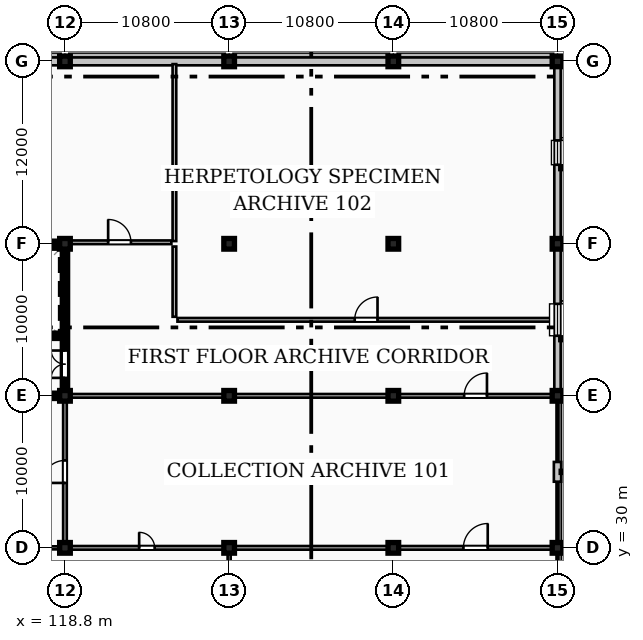
"""IFC4 building model, lengths in metres.
Left out: names, types, materials, properties, quantities, classifications, styles, units other than length and angle.
Written with IfcOpenShell. Run it as: python <this file> out.ifc"""

import sys

from ifc_helpers import new_model, si_unit, direction, frame, frame_2d, origin, origin_2d, place, context, subcontext, project, spatial, polyline, rectangle, outline, extrude, element, fill, save


model = new_model("IFC4")
c1 = context("Model", 3, precision=1e-05, world=origin(), true_north=direction((0.0, 1.0)))
c2 = subcontext(c1, "Body", "Model", "MODEL_VIEW")
j1 = project(units=[si_unit("LENGTHUNIT", "METRE"), si_unit("PLANEANGLEUNIT", "RADIAN")], contexts=[c1])
p1 = place(None, origin())
s1 = spatial("IfcSite", under=j1, at=p1, CompositionType="ELEMENT")
p2 = place(p1, origin())
s2 = spatial("IfcBuilding", under=s1, at=p2, CompositionType="ELEMENT")
p3 = place(p2, frame((0.0, 0.0, 4.8)))
s3 = spatial("IfcBuildingStorey", under=s2, at=p3, CompositionType="ELEMENT", Elevation=4.8)
for number, where, z_axis, x_axis in (
    (1, (118.8, 30.0, 0.0), (0.0, 0.0, 1.0), (1.0, 0.0, 0.0)),
    (2, (118.8, 40.0, 0.0), (0.0, 0.0, 1.0), (1.0, 0.0, 0.0)),
    (3, (118.8, 50.0, 0.0), (0.0, 0.0, 1.0), (1.0, 0.0, 0.0)),
    (4, (118.8, 62.0, 0.0), (0.0, 0.0, 1.0), (1.0, 0.0, 0.0)),
    (5, (129.6, 30.0, 0.0), (0.0, 0.0, 1.0), (1.0, 0.0, 0.0)),
    (6, (129.6, 40.0, 0.0), (0.0, 0.0, 1.0), (1.0, 0.0, 0.0)),
    (7, (129.6, 50.0, 0.0), (0.0, 0.0, 1.0), (1.0, 0.0, 0.0)),
    (8, (129.6, 62.0, 0.0), (0.0, 0.0, 1.0), (1.0, 0.0, 0.0)),
    (9, (140.4, 30.0, 0.0), (0.0, 0.0, 1.0), (1.0, 0.0, 0.0)),
    (10, (140.4, 40.0, 0.0), (0.0, 0.0, 1.0), (1.0, 0.0, 0.0)),
    (11, (140.4, 50.0, 0.0), (0.0, 0.0, 1.0), (1.0, 0.0, 0.0)),
    (12, (140.4, 62.0, 0.0), (0.0, 0.0, 1.0), (1.0, 0.0, 0.0)),
    (13, (151.2, 30.0, 0.0), (0.0, 0.0, 1.0), (1.0, 0.0, 0.0)),
    (14, (151.2, 40.0, 0.0), (0.0, 0.0, 1.0), (1.0, 0.0, 0.0)),
    (15, (151.2, 50.0, 0.0), (0.0, 0.0, 1.0), (1.0, 0.0, 0.0)),
    (16, (151.2, 62.0, 0.0), (0.0, 0.0, 1.0), (1.0, 0.0, 0.0)),
):
    element("IfcColumn", number, at=place(p3, frame(where, z_axis=z_axis, x_axis=x_axis)), inside=s3, PredefinedType="COLUMN", context=c2, shape_type="SweptSolid", body=[
        extrude(rectangle(XDim=0.7, YDim=0.7, at=origin_2d()), origin(), (0.0, 0.0, 1.0), 4.8),
    ])
p4 = place(p3, frame((151.2, 29.63, 0.0), z_axis=(0.0, 0.0, 1.0), x_axis=(0.0, 1.0, 0.0)))
e17 = element("IfcWall", 17, at=p4, inside=s3, PredefinedType="STANDARD", context=c2, shape_type="SweptSolid", body=[
    extrude(rectangle(XDim=0.225, YDim=0.3, at=frame_2d((0.113, 0.0))), origin(), (0.0, 0.0, 1.0), 4.56),
])
p5 = place(p3, frame((151.2, 34.35, 0.0), z_axis=(0.0, 0.0, 1.0), x_axis=(0.0, 1.0, 0.0)))
e18 = element("IfcWall", 18, at=p5, inside=s3, PredefinedType="STANDARD", context=c2, shape_type="SweptSolid", body=[
    extrude(rectangle(XDim=1.3, YDim=0.48, at=frame_2d((0.65, 0.0))), origin(), (0.0, 0.0, 1.0), 4.13),
])
for number, where, z_axis, x_axis in (
    (19, (151.2, 30.145, 0.0), (0.0, 0.0, 1.0), (0.0, 1.0, 0.0)),
    (20, (151.2, 39.63, 0.0), (0.0, 0.0, 1.0), (0.0, 1.0, 0.0)),
):
    element("IfcWall", number, at=place(p3, frame(where, z_axis=z_axis, x_axis=x_axis)), inside=s3, PredefinedType="STANDARD", context=c2, shape_type="SweptSolid", body=[
        extrude(rectangle(XDim=0.225, YDim=0.3, at=frame_2d((0.113, 0.0))), origin(), (0.0, 0.0, 1.0), 4.56),
    ])
p6 = place(p3, frame((151.2, 40.145, 0.0), z_axis=(0.0, 0.0, 1.0), x_axis=(0.0, 1.0, 0.0)))
e21 = element("IfcWall", 21, at=p6, inside=s3, PredefinedType="STANDARD", context=c2, shape_type="SweptSolid", body=[
    extrude(rectangle(XDim=9.71, YDim=0.42, at=frame_2d((4.855, 0.0))), origin(), (0.0, 0.0, 1.0), 4.13),
])
p7 = place(p6, frame((3.805, 0.0, 1.2)))
e22 = element("IfcOpeningElement", 22, at=p7, cuts=e21, PredefinedType="OPENING", context=c2, shape_type="SweptSolid", body=[
    extrude(rectangle(XDim=2.1, YDim=1.6, at=frame_2d((1.05, 0.8))), frame((0.0, 0.22, 0.0), z_axis=(0.0, -1.0, 0.0), x_axis=(1.0, 0.0, 0.0)), (0.0, 0.0, 1.0), 0.44),
])
p8 = place(p3, frame((151.2, 50.145, 0.0), z_axis=(0.0, 0.0, 1.0), x_axis=(0.0, 1.0, 0.0)))
e23 = element("IfcWall", 23, at=p8, inside=s3, PredefinedType="STANDARD", context=c2, shape_type="SweptSolid", body=[
    extrude(rectangle(XDim=11.71, YDim=0.42, at=frame_2d((5.855, 0.0))), origin(), (0.0, 0.0, 1.0), 4.13),
])
p9 = place(p8, frame((5.055, 0.0, 1.2)))
e24 = element("IfcOpeningElement", 24, at=p9, cuts=e23, PredefinedType="OPENING", context=c2, shape_type="SweptSolid", body=[
    extrude(rectangle(XDim=1.6, YDim=1.8, at=frame_2d((0.8, 0.9))), frame((0.0, 0.22, 0.0), z_axis=(0.0, -1.0, 0.0), x_axis=(1.0, 0.0, 0.0)), (0.0, 0.0, 1.0), 0.44),
])
p10 = place(p3, frame((151.055, 62.0, 0.0), z_axis=(0.0, 0.0, 1.0), x_axis=(-1.0, 0.0, 0.0)))
e25 = element("IfcWall", 25, at=p10, inside=s3, PredefinedType="SOLIDWALL", context=c2, shape_type="SweptSolid", body=[
    extrude(rectangle(XDim=10.51, YDim=0.52, at=frame_2d((5.255, 0.0))), origin(), (0.0, 0.0, 1.0), 4.13),
])
p11 = place(p3, frame((140.255, 62.0, 0.0), z_axis=(0.0, 0.0, 1.0), x_axis=(-1.0, 0.0, 0.0)))
e26 = element("IfcWall", 26, at=p11, inside=s3, PredefinedType="SOLIDWALL", context=c2, shape_type="SweptSolid", body=[
    extrude(rectangle(XDim=10.51, YDim=0.52, at=frame_2d((5.255, 0.0))), origin(), (0.0, 0.0, 1.0), 3.83),
])
for number, where, z_axis, x_axis in (
    (27, (129.455, 62.0, 0.0), (0.0, 0.0, 1.0), (-1.0, 0.0, 0.0)),
    (28, (118.655, 62.0, 0.0), (0.0, 0.0, 1.0), (-1.0, 0.0, 0.0)),
):
    element("IfcWall", number, at=place(p3, frame(where, z_axis=z_axis, x_axis=x_axis)), inside=s3, PredefinedType="SOLIDWALL", context=c2, shape_type="SweptSolid", body=[
        extrude(rectangle(XDim=10.51, YDim=0.52, at=frame_2d((5.255, 0.0))), origin(), (0.0, 0.0, 1.0), 3.83),
    ])
p12 = place(p3, frame((151.55, 62.0, -0.02), z_axis=(0.0, 0.0, 1.0), x_axis=(1.0, 0.0, 0.0)))
e29 = element("IfcWall", 29, at=p12, inside=s3, PredefinedType="STANDARD", context=c2, shape_type="SweptSolid", body=[
    extrude(outline(polyline([(0.0, 0.0), (10.25, 0.0), (10.25, 0.04), (0.0, 1.12), (0.0, 0.0)])), frame((0.0, 0.14, 0.0), z_axis=(0.0, -1.0, 0.0), x_axis=(1.0, 0.0, 0.0)), (0.0, 0.0, 1.0), 0.28),
])
for number, where, z_axis, x_axis in (
    (30, (108.35, 40.0, 0.0), (0.0, 0.0, 1.0), (1.0, 0.0, 0.0)),
    (31, (108.35, 50.0, 0.0), (0.0, 0.0, 1.0), (1.0, 0.0, 0.0)),
):
    element("IfcWall", number, at=place(p3, frame(where, z_axis=z_axis, x_axis=x_axis)), inside=s3, PredefinedType="SHEAR", context=c2, shape_type="SweptSolid", body=[
        extrude(rectangle(XDim=10.1, YDim=0.35, at=frame_2d((5.05, 0.0))), origin(), (0.0, 0.0, 1.0), 4.56),
    ])
p13 = place(p3, frame((118.8, 40.35, 0.0), z_axis=(0.0, 0.0, 1.0), x_axis=(0.0, 1.0, 0.0)))
e32 = element("IfcWall", 32, at=p13, inside=s3, PredefinedType="SHEAR", context=c2, shape_type="SweptSolid", body=[
    extrude(rectangle(XDim=9.3, YDim=0.35, at=frame_2d((4.65, 0.0))), origin(), (0.0, 0.0, 1.0), 4.56),
])
p14 = place(p13, frame((0.83, 0.0, 0.0)))
e33 = element("IfcOpeningElement", 33, at=p14, cuts=e32, PredefinedType="OPENING", context=c2, shape_type="SweptSolid", body=[
    extrude(rectangle(XDim=1.8, YDim=2.25, at=frame_2d((0.9, 1.125))), frame((0.0, 0.185, 0.0), z_axis=(0.0, -1.0, 0.0), x_axis=(1.0, 0.0, 0.0)), (0.0, 0.0, 1.0), 0.37),
])
p15 = place(p3, frame((113.13, 43.95, 0.0), z_axis=(0.0, 0.0, 1.0), x_axis=(1.0, 0.0, 0.0)))
e34 = element("IfcWall", 34, at=p15, inside=s3, PredefinedType="SHEAR", context=c2, shape_type="SweptSolid", body=[
    extrude(rectangle(XDim=5.49, YDim=0.35, at=frame_2d((2.745, 0.0))), origin(), (0.0, 0.0, 1.0), 4.56),
])
p16 = place(p15, frame((2.1, 0.0, 0.0)))
e35 = element("IfcOpeningElement", 35, at=p16, cuts=e34, PredefinedType="OPENING", context=c2, shape_type="SweptSolid", body=[
    extrude(rectangle(XDim=1.1, YDim=2.2, at=frame_2d((0.55, 1.1))), frame((0.0, 0.185, 0.0), z_axis=(0.0, -1.0, 0.0), x_axis=(1.0, 0.0, 0.0)), (0.0, 0.0, 1.0), 0.37),
])
p17 = place(p3, frame((118.98, 30.0, 0.0), z_axis=(0.0, 0.0, 1.0), x_axis=(1.0, 0.0, 0.0)))
e36 = element("IfcWall", 36, at=p17, inside=s3, PredefinedType="SOLIDWALL", context=c2, shape_type="SweptSolid", body=[
    extrude(rectangle(XDim=10.42, YDim=0.24, at=frame_2d((5.21, 0.0))), origin(), (0.0, 0.0, 1.0), 3.83),
])
p18 = place(p17, frame((4.7, 0.0, 0.0)))
e37 = element("IfcOpeningElement", 37, at=p18, cuts=e36, PredefinedType="OPENING", context=c2, shape_type="SweptSolid", body=[
    extrude(rectangle(XDim=1.02, YDim=2.2, at=frame_2d((0.51, 1.1))), frame((0.0, 0.13, 0.0), z_axis=(0.0, -1.0, 0.0), x_axis=(1.0, 0.0, 0.0)), (0.0, 0.0, 1.0), 0.26),
])
p19 = place(p3, frame((129.8, 30.0, 0.0), z_axis=(0.0, 0.0, 1.0), x_axis=(1.0, 0.0, 0.0)))
e38 = element("IfcWall", 38, at=p19, inside=s3, PredefinedType="SOLIDWALL", context=c2, shape_type="SweptSolid", body=[
    extrude(rectangle(XDim=10.4, YDim=0.24, at=frame_2d((5.2, 0.0))), origin(), (0.0, 0.0, 1.0), 3.83),
])
p20 = place(p3, frame((140.6, 30.0, 0.0), z_axis=(0.0, 0.0, 1.0), x_axis=(1.0, 0.0, 0.0)))
e39 = element("IfcWall", 39, at=p20, inside=s3, PredefinedType="SOLIDWALL", context=c2, shape_type="SweptSolid", body=[
    extrude(rectangle(XDim=10.42, YDim=0.24, at=frame_2d((5.21, 0.0))), origin(), (0.0, 0.0, 1.0), 4.13),
])
p21 = place(p20, frame((4.41, 0.0, 0.0)))
e40 = element("IfcOpeningElement", 40, at=p21, cuts=e39, PredefinedType="OPENING", context=c2, shape_type="SweptSolid", body=[
    extrude(rectangle(XDim=1.6, YDim=2.3, at=frame_2d((0.8, 1.15))), frame((0.0, 0.13, 0.0), z_axis=(0.0, -1.0, 0.0), x_axis=(1.0, 0.0, 0.0)), (0.0, 0.0, 1.0), 0.26),
])
p22 = place(p3, frame((118.98, 40.0, 0.0), z_axis=(0.0, 0.0, 1.0), x_axis=(1.0, 0.0, 0.0)))
e41 = element("IfcWall", 41, at=p22, inside=s3, PredefinedType="SOLIDWALL", context=c2, shape_type="SweptSolid", body=[
    extrude(rectangle(XDim=10.42, YDim=0.24, at=frame_2d((5.21, 0.0))), origin(), (0.0, 0.0, 1.0), 3.83),
])
p23 = place(p3, frame((129.8, 40.0, 0.0), z_axis=(0.0, 0.0, 1.0), x_axis=(1.0, 0.0, 0.0)))
e42 = element("IfcWall", 42, at=p23, inside=s3, PredefinedType="SOLIDWALL", context=c2, shape_type="SweptSolid", body=[
    extrude(rectangle(XDim=10.4, YDim=0.24, at=frame_2d((5.2, 0.0))), origin(), (0.0, 0.0, 1.0), 3.83),
])
p24 = place(p3, frame((140.6, 40.0, 0.0), z_axis=(0.0, 0.0, 1.0), x_axis=(1.0, 0.0, 0.0)))
e43 = element("IfcWall", 43, at=p24, inside=s3, PredefinedType="SOLIDWALL", context=c2, shape_type="SweptSolid", body=[
    extrude(rectangle(XDim=10.42, YDim=0.24, at=frame_2d((5.21, 0.0))), origin(), (0.0, 0.0, 1.0), 4.13),
])
p25 = place(p24, frame((4.46, 0.0, 0.0)))
e44 = element("IfcOpeningElement", 44, at=p25, cuts=e43, PredefinedType="OPENING", context=c2, shape_type="SweptSolid", body=[
    extrude(rectangle(XDim=1.5, YDim=2.4, at=frame_2d((0.75, 1.2))), frame((0.0, 0.13, 0.0), z_axis=(0.0, -1.0, 0.0), x_axis=(1.0, 0.0, 0.0)), (0.0, 0.0, 1.0), 0.26),
])
p26 = place(p3, frame((126.2, 45.0, 0.0), z_axis=(0.0, 0.0, 1.0), x_axis=(1.0, 0.0, 0.0)))
e45 = element("IfcWall", 45, at=p26, inside=s3, PredefinedType="SOLIDWALL", context=c2, shape_type="SweptSolid", body=[
    extrude(rectangle(XDim=24.82, YDim=0.24, at=frame_2d((12.41, 0.0))), origin(), (0.0, 0.0, 1.0), 4.52),
])
p27 = place(p26, frame((11.66, 0.0, 0.0)))
e46 = element("IfcOpeningElement", 46, at=p27, cuts=e45, PredefinedType="OPENING", context=c2, shape_type="SweptSolid", body=[
    extrude(rectangle(XDim=1.5, YDim=2.4, at=frame_2d((0.75, 1.2))), frame((0.0, 0.13, 0.0), z_axis=(0.0, -1.0, 0.0), x_axis=(1.0, 0.0, 0.0)), (0.0, 0.0, 1.0), 0.26),
])
p28 = place(p3, frame((118.98, 50.1, 0.0), z_axis=(0.0, 0.0, 1.0), x_axis=(1.0, 0.0, 0.0)))
e47 = element("IfcWall", 47, at=p28, inside=s3, PredefinedType="SOLIDWALL", context=c2, shape_type="SweptSolid", body=[
    extrude(rectangle(XDim=6.82, YDim=0.24, at=frame_2d((3.41, 0.0))), origin(), (0.0, 0.0, 1.0), 3.83),
])
p29 = place(p28, frame((2.66, 0.0, 0.0)))
e48 = element("IfcOpeningElement", 48, at=p29, cuts=e47, PredefinedType="OPENING", context=c2, shape_type="SweptSolid", body=[
    extrude(rectangle(XDim=1.5, YDim=2.4, at=frame_2d((0.75, 1.2))), frame((0.0, 0.13, 0.0), z_axis=(0.0, -1.0, 0.0), x_axis=(1.0, 0.0, 0.0)), (0.0, 0.0, 1.0), 0.26),
])
p30 = place(p3, frame((118.8, 30.2, 0.0), z_axis=(0.0, 0.0, 1.0), x_axis=(0.0, 1.0, 0.0)))
e49 = element("IfcWall", 49, at=p30, inside=s3, PredefinedType="SOLIDWALL", context=c2, shape_type="SweptSolid", body=[
    extrude(rectangle(XDim=9.62, YDim=0.24, at=frame_2d((4.81, 0.0))), origin(), (0.0, 0.0, 1.0), 3.969),
])
p31 = place(p30, frame((4.07, 0.0, 0.0)))
e50 = element("IfcOpeningElement", 50, at=p31, cuts=e49, PredefinedType="OPENING", context=c2, shape_type="SweptSolid", body=[
    extrude(rectangle(XDim=1.48, YDim=2.42, at=frame_2d((0.74, 1.21))), frame((0.0, 0.13, 0.0), z_axis=(0.0, -1.0, 0.0), x_axis=(1.0, 0.0, 0.0)), (0.0, 0.0, 1.0), 0.26),
])
p32 = place(p3, frame((108.18, 30.0, 0.0), z_axis=(0.0, 0.0, 1.0), x_axis=(1.0, 0.0, 0.0)))
e51 = element("IfcWall", 51, at=p32, inside=s3, PredefinedType="SOLIDWALL", context=c2, shape_type="SweptSolid", body=[
    extrude(rectangle(XDim=10.44, YDim=0.2, at=frame_2d((5.22, 0.0))), origin(), (0.0, 0.0, 1.0), 3.83),
])
p33 = place(p3, frame((126.0, 45.2, 0.0), z_axis=(0.0, 0.0, 1.0), x_axis=(0.0, 1.0, 0.0)))
e52 = element("IfcWall", 52, at=p33, inside=s3, PredefinedType="SOLIDWALL", context=c2, shape_type="SweptSolid", body=[
    extrude(rectangle(XDim=4.62, YDim=0.24, at=frame_2d((2.31, 0.0))), origin(), (0.0, 0.0, 1.0), 4.069),
])
p34 = place(p3, frame((126.0, 50.18, 0.0), z_axis=(0.0, 0.0, 1.0), x_axis=(0.0, 1.0, 0.0)))
e53 = element("IfcWall", 53, at=p34, inside=s3, PredefinedType="SOLIDWALL", context=c2, shape_type="SweptSolid", body=[
    extrude(rectangle(XDim=11.64, YDim=0.24, at=frame_2d((5.82, 0.0))), origin(), (0.0, 0.0, 1.0), 4.069),
])
p35 = place(p3, frame((129.6, 20.2, 0.0), z_axis=(0.0, 0.0, 1.0), x_axis=(0.0, 1.0, 0.0)))
e54 = element("IfcWall", 54, at=p35, inside=s3, PredefinedType="SOLIDWALL", context=c2, shape_type="SweptSolid", body=[
    extrude(rectangle(XDim=9.6, YDim=0.2, at=frame_2d((4.8, 0.0))), origin(), (0.0, 0.0, 1.0), 3.969),
])
p36 = place(p7, origin())
e55 = element("IfcWindow", 55, at=p36, inside=s3, PartitioningType="SINGLE_PANEL", PredefinedType="WINDOW", context=c2, shape_type="SweptSolid", body=[
    extrude(rectangle(XDim=2.1, YDim=1.6, at=frame_2d((1.05, 0.8))), frame((0.0, 0.03, 0.0), z_axis=(0.0, -1.0, 0.0), x_axis=(1.0, 0.0, 0.0)), (0.0, 0.0, 1.0), 0.06),
])
fill(e22, e55)
p37 = place(p9, origin())
e56 = element("IfcWindow", 56, at=p37, inside=s3, PartitioningType="SINGLE_PANEL", PredefinedType="WINDOW", context=c2, shape_type="SweptSolid", body=[
    extrude(rectangle(XDim=1.6, YDim=1.8, at=frame_2d((0.8, 0.9))), frame((0.0, 0.03, 0.0), z_axis=(0.0, -1.0, 0.0), x_axis=(1.0, 0.0, 0.0)), (0.0, 0.0, 1.0), 0.06),
])
fill(e24, e56)
p38 = place(p14, origin())
e57 = element("IfcDoor", 57, at=p38, inside=s3, OperationType="DOUBLE_DOOR_SINGLE_SWING", PredefinedType="DOOR", context=c2, shape_type="SweptSolid", body=[
    extrude(rectangle(XDim=1.8, YDim=2.25, at=frame_2d((0.9, 1.125))), frame((0.0, 0.025, 0.0), z_axis=(0.0, -1.0, 0.0), x_axis=(1.0, 0.0, 0.0)), (0.0, 0.0, 1.0), 0.05),
])
fill(e33, e57)
p39 = place(p18, origin())
e58 = element("IfcDoor", 58, at=p39, inside=s3, OperationType="SINGLE_SWING_LEFT", PredefinedType="DOOR", context=c2, shape_type="SweptSolid", body=[
    extrude(rectangle(XDim=1.02, YDim=2.2, at=frame_2d((0.51, 1.1))), frame((0.0, 0.025, 0.0), z_axis=(0.0, -1.0, 0.0), x_axis=(1.0, 0.0, 0.0)), (0.0, 0.0, 1.0), 0.05),
])
fill(e37, e58)
p40 = place(p21, origin())
e59 = element("IfcDoor", 59, at=p40, inside=s3, OperationType="SINGLE_SWING_RIGHT", PredefinedType="DOOR", context=c2, shape_type="SweptSolid", body=[
    extrude(rectangle(XDim=1.6, YDim=2.3, at=frame_2d((0.8, 1.15))), frame((0.0, 0.025, 0.0), z_axis=(0.0, -1.0, 0.0), x_axis=(1.0, 0.0, 0.0)), (0.0, 0.0, 1.0), 0.05),
])
fill(e40, e59)
p41 = place(p25, origin())
e60 = element("IfcDoor", 60, at=p41, inside=s3, OperationType="SINGLE_SWING_RIGHT", PredefinedType="DOOR", context=c2, shape_type="SweptSolid", body=[
    extrude(rectangle(XDim=1.5, YDim=2.4, at=frame_2d((0.75, 1.2))), frame((0.0, 0.025, 0.0), z_axis=(0.0, -1.0, 0.0), x_axis=(1.0, 0.0, 0.0)), (0.0, 0.0, 1.0), 0.05),
])
fill(e44, e60)
p42 = place(p27, origin())
e61 = element("IfcDoor", 61, at=p42, inside=s3, OperationType="SINGLE_SWING_RIGHT", PredefinedType="DOOR", context=c2, shape_type="SweptSolid", body=[
    extrude(rectangle(XDim=1.5, YDim=2.4, at=frame_2d((0.75, 1.2))), frame((0.0, 0.025, 0.0), z_axis=(0.0, -1.0, 0.0), x_axis=(1.0, 0.0, 0.0)), (0.0, 0.0, 1.0), 0.05),
])
fill(e46, e61)
p43 = place(p29, origin())
e62 = element("IfcDoor", 62, at=p43, inside=s3, OperationType="SINGLE_SWING_LEFT", PredefinedType="DOOR", context=c2, shape_type="SweptSolid", body=[
    extrude(rectangle(XDim=1.5, YDim=2.4, at=frame_2d((0.75, 1.2))), frame((0.0, 0.025, 0.0), z_axis=(0.0, -1.0, 0.0), x_axis=(1.0, 0.0, 0.0)), (0.0, 0.0, 1.0), 0.05),
])
fill(e48, e62)
p44 = place(p31, origin())
e63 = element("IfcDoor", 63, at=p44, inside=s3, OperationType="SINGLE_SWING_LEFT", PredefinedType="DOOR", context=c2, shape_type="SweptSolid", body=[
    extrude(rectangle(XDim=1.48, YDim=2.42, at=frame_2d((0.74, 1.21))), frame((0.0, 0.025, 0.0), z_axis=(0.0, -1.0, 0.0), x_axis=(1.0, 0.0, 0.0)), (0.0, 0.0, 1.0), 0.05),
])
fill(e50, e63)
save(model, sys.argv[1])
